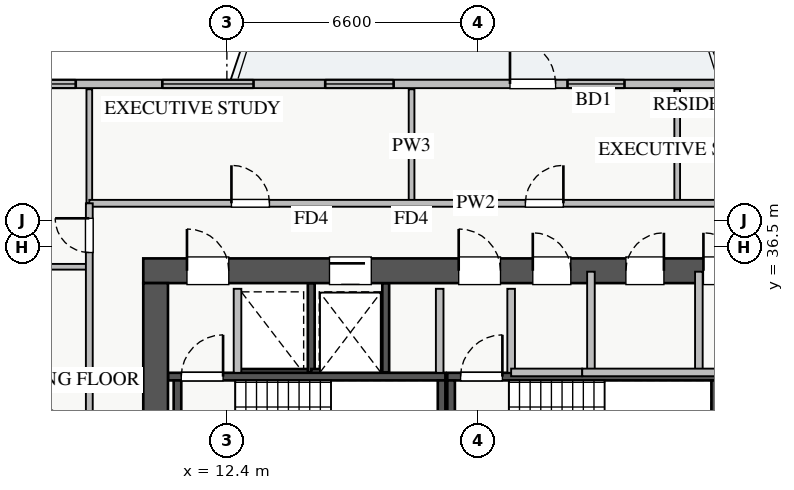
"""IFC4 building model, lengths in metres.
Left out: names, types, materials, properties, quantities, classifications, styles, units other than length and angle.
Written with IfcOpenShell. Run it as: python <this file> out.ifc"""

import sys

from ifc_helpers import new_model, si_unit, direction, frame, frame_2d, origin, place, context, subcontext, project, spatial, rectangle, extrude, source, transform, mapped, element, fill, save


model = new_model("IFC4")
c1 = context("Model", 3, precision=1e-05, world=origin(), true_north=direction((0.0, 1.0)))
c2 = subcontext(c1, "Body", "Model", "MODEL_VIEW")
j1 = project(units=[si_unit("LENGTHUNIT", "METRE"), si_unit("PLANEANGLEUNIT", "RADIAN")], contexts=[c1])
p1 = place(None, origin())
s1 = spatial("IfcSite", under=j1, at=p1, CompositionType="ELEMENT")
p2 = place(p1, origin())
s2 = spatial("IfcBuilding", under=s1, at=p2, CompositionType="ELEMENT")
p3 = place(p2, frame((0.0, 0.0, 110.0)))
s3 = spatial("IfcBuildingStorey", under=s2, at=p3, CompositionType="ELEMENT", Elevation=110.0)
p4 = place(p3, frame((12.68, 33.2, 0.0), z_axis=(0.0, 0.0, 1.0), x_axis=(1.0, 0.0, 0.0)))
e1 = element("IfcWall", 1, at=p4, inside=s3, PredefinedType="SHEAR", context=c2, shape_type="SweptSolid", body=[
    extrude(rectangle(XDim=1.94, YDim=0.18, at=frame_2d((0.97, 0.0))), origin(), (0.0, 0.0, 1.0), 3.07),
])
p5 = place(p3, frame((14.62, 33.2, 0.0), z_axis=(0.0, 0.0, 1.0), x_axis=(0.0, 1.0, 0.0)))
e2 = element("IfcWall", 2, at=p5, inside=s3, PredefinedType="SHEAR", context=c2, shape_type="SweptSolid", body=[
    extrude(rectangle(XDim=2.35, YDim=0.18, at=frame_2d((1.175, 0.0))), origin(), (0.0, 0.0, 1.0), 3.07),
])
p6 = place(p3, frame((14.62, 33.2, 0.0), z_axis=(0.0, 0.0, 1.0), x_axis=(1.0, 0.0, 0.0)))
e3 = element("IfcWall", 3, at=p6, inside=s3, PredefinedType="SHEAR", context=c2, shape_type="SweptSolid", body=[
    extrude(rectangle(XDim=1.96, YDim=0.18, at=frame_2d((0.98, 0.0))), origin(), (0.0, 0.0, 1.0), 3.07),
])
p7 = place(p3, frame((16.58, 33.2, 0.0), z_axis=(0.0, 0.0, 1.0), x_axis=(0.0, 1.0, 0.0)))
e4 = element("IfcWall", 4, at=p7, inside=s3, PredefinedType="SHEAR", context=c2, shape_type="SweptSolid", body=[
    extrude(rectangle(XDim=2.35, YDim=0.18, at=frame_2d((1.175, 0.0))), origin(), (0.0, 0.0, 1.0), 3.07),
])
p8 = place(p3, frame((10.85, 33.09, 0.0), z_axis=(0.0, 0.0, 1.0), x_axis=(1.0, 0.0, 0.0)))
e5 = element("IfcWall", 5, at=p8, inside=s3, PredefinedType="SHEAR", context=c2, shape_type="SweptSolid", body=[
    extrude(rectangle(XDim=7.3, YDim=0.2, at=frame_2d((3.65, 0.0))), origin(), (0.0, 0.0, 1.0), 3.25),
])
p9 = place(p8, frame((0.35, 0.0, 0.0)))
e6 = element("IfcOpeningElement", 6, at=p9, cuts=e5, PredefinedType="OPENING", context=c2, shape_type="SweptSolid", body=[
    extrude(rectangle(XDim=1.1, YDim=2.05, at=frame_2d((0.55, 1.025))), frame((0.0, 0.11, 0.0), z_axis=(0.0, -1.0, 0.0), x_axis=(1.0, 0.0, 0.0)), (0.0, 0.0, 1.0), 0.22),
])
for number, where, z_axis, x_axis in (
    (7, (11.1, 30.05, 0.0), (0.0, 0.0, 1.0), (0.0, 1.0, 0.0)),
    (8, (18.05, 30.05, 0.0), (0.0, 0.0, 1.0), (0.0, 1.0, 0.0)),
):
    element("IfcWall", number, at=place(p3, frame(where, z_axis=z_axis, x_axis=x_axis)), inside=s3, PredefinedType="SHEAR", context=c2, shape_type="SweptSolid", body=[
        extrude(rectangle(XDim=2.94, YDim=0.2, at=frame_2d((1.47, 0.0))), origin(), (0.0, 0.0, 1.0), 3.25),
    ])
p10 = place(p3, frame((18.2, 33.09, 0.0), z_axis=(0.0, 0.0, 1.0), x_axis=(1.0, 0.0, 0.0)))
e9 = element("IfcWall", 9, at=p10, inside=s3, PredefinedType="SHEAR", context=c2, shape_type="SweptSolid", body=[
    extrude(rectangle(XDim=7.15, YDim=0.2, at=frame_2d((3.575, 0.0))), origin(), (0.0, 0.0, 1.0), 3.25),
])
p11 = place(p10, frame((0.35, 0.0, 0.0)))
e10 = element("IfcOpeningElement", 10, at=p11, cuts=e9, PredefinedType="OPENING", context=c2, shape_type="SweptSolid", body=[
    extrude(rectangle(XDim=1.1, YDim=2.05, at=frame_2d((0.55, 1.025))), frame((0.0, 0.11, 0.0), z_axis=(0.0, -1.0, 0.0), x_axis=(1.0, 0.0, 0.0)), (0.0, 0.0, 1.0), 0.22),
])
for number, where, z_axis, x_axis in (
    (11, (18.3, 30.05, 0.0), (0.0, 0.0, 1.0), (0.0, 1.0, 0.0)),
    (12, (25.25, 30.05, 0.0), (0.0, 0.0, 1.0), (0.0, 1.0, 0.0)),
):
    element("IfcWall", number, at=place(p3, frame(where, z_axis=z_axis, x_axis=x_axis)), inside=s3, PredefinedType="SHEAR", context=c2, shape_type="SweptSolid", body=[
        extrude(rectangle(XDim=2.94, YDim=0.2, at=frame_2d((1.47, 0.0))), origin(), (0.0, 0.0, 1.0), 3.25),
    ])
p12 = place(p3, frame((10.2, 35.875, 0.0), z_axis=(0.0, 0.0, 1.0), x_axis=(1.0, 0.0, 0.0)))
e13 = element("IfcWall", 13, at=p12, inside=s3, PredefinedType="SHEAR", context=c2, shape_type="SweptSolid", body=[
    extrude(rectangle(XDim=17.6, YDim=0.65, at=frame_2d((8.8, 0.0))), origin(), (0.0, 0.0, 1.0), 3.25),
])
p13 = place(p12, frame((1.15, 0.0, 0.0)))
e14 = element("IfcOpeningElement", 14, at=p13, cuts=e13, PredefinedType="OPENING", context=c2, shape_type="SweptSolid", body=[
    extrude(rectangle(XDim=1.1, YDim=2.05, at=frame_2d((0.55, 1.025))), frame((0.0, 0.335, 0.0), z_axis=(0.0, -1.0, 0.0), x_axis=(1.0, 0.0, 0.0)), (0.0, 0.0, 1.0), 0.67),
])
p14 = place(p12, frame((8.3, 0.0, 0.0)))
e15 = element("IfcOpeningElement", 15, at=p14, cuts=e13, PredefinedType="OPENING", context=c2, shape_type="SweptSolid", body=[
    extrude(rectangle(XDim=1.1, YDim=2.05, at=frame_2d((0.55, 1.025))), frame((0.0, 0.335, 0.0), z_axis=(0.0, -1.0, 0.0), x_axis=(1.0, 0.0, 0.0)), (0.0, 0.0, 1.0), 0.67),
])
p15 = place(p12, frame((4.9, 0.0, 0.0)))
e16 = element("IfcOpeningElement", 16, at=p15, cuts=e13, PredefinedType="OPENING", context=c2, shape_type="SweptSolid", body=[
    extrude(rectangle(XDim=1.1, YDim=2.05, at=frame_2d((0.55, 1.025))), frame((0.0, 0.335, 0.0), z_axis=(0.0, -1.0, 0.0), x_axis=(1.0, 0.0, 0.0)), (0.0, 0.0, 1.0), 0.67),
])
p16 = place(p12, frame((14.74, 0.0, 0.0)))
e17 = element("IfcOpeningElement", 17, at=p16, cuts=e13, PredefinedType="OPENING", context=c2, shape_type="SweptSolid", body=[
    extrude(rectangle(XDim=1.0, YDim=2.05, at=frame_2d((0.5, 1.025))), frame((0.0, 0.335, 0.0), z_axis=(0.0, -1.0, 0.0), x_axis=(1.0, 0.0, 0.0)), (0.0, 0.0, 1.0), 0.67),
])
p17 = place(p12, frame((10.25, 0.0, 0.0)))
e18 = element("IfcOpeningElement", 18, at=p17, cuts=e13, PredefinedType="OPENING", context=c2, shape_type="SweptSolid", body=[
    extrude(rectangle(XDim=1.0, YDim=2.05, at=frame_2d((0.5, 1.025))), frame((0.0, 0.335, 0.0), z_axis=(0.0, -1.0, 0.0), x_axis=(1.0, 0.0, 0.0)), (0.0, 0.0, 1.0), 0.67),
])
p18 = place(p12, frame((12.7, 0.0, 0.0)))
e19 = element("IfcOpeningElement", 19, at=p18, cuts=e13, PredefinedType="OPENING", context=c2, shape_type="SweptSolid", body=[
    extrude(rectangle(XDim=1.0, YDim=2.05, at=frame_2d((0.5, 1.025))), frame((0.0, 0.335, 0.0), z_axis=(0.0, -1.0, 0.0), x_axis=(1.0, 0.0, 0.0)), (0.0, 0.0, 1.0), 0.67),
])
p19 = place(p3, frame((10.525, 29.65, 0.0), z_axis=(0.0, 0.0, 1.0), x_axis=(0.0, 1.0, 0.0)))
e20 = element("IfcWall", 20, at=p19, inside=s3, PredefinedType="SHEAR", context=c2, shape_type="SweptSolid", body=[
    extrude(rectangle(XDim=5.9, YDim=0.65, at=frame_2d((2.95, 0.0))), origin(), (0.0, 0.0, 1.0), 3.25),
])
p20 = place(p3, frame((6.55, 40.79, 0.0), z_axis=(0.0, 0.0, 1.0), x_axis=(1.0, 0.0, 0.0)))
e21 = element("IfcWall", 21, at=p20, inside=s3, PredefinedType="STANDARD", context=c2, shape_type="SweptSolid", body=[
    extrude(rectangle(XDim=24.9, YDim=0.22, at=frame_2d((12.45, 0.0))), origin(), (0.0, 0.0, 1.0), 2.61),
])
p21 = place(p20, frame((13.3, 0.0, 0.0)))
e22 = element("IfcOpeningElement", 22, at=p21, cuts=e21, PredefinedType="OPENING", context=c2, shape_type="SweptSolid", body=[
    extrude(rectangle(XDim=1.2, YDim=2.1, at=frame_2d((0.6, 1.05))), frame((0.0, 0.12, 0.0), z_axis=(0.0, -1.0, 0.0), x_axis=(1.0, 0.0, 0.0)), (0.0, 0.0, 1.0), 0.24),
])
p22 = place(p20, frame((0.373, 0.0, 0.9)))
e23 = element("IfcOpeningElement", 23, at=p22, cuts=e21, PredefinedType="OPENING", context=c2, shape_type="SweptSolid", body=[
    extrude(rectangle(XDim=1.5, YDim=1.5, at=frame_2d((0.75, 0.75))), frame((0.0, 0.12, 0.0), z_axis=(0.0, -1.0, 0.0), x_axis=(1.0, 0.0, 0.0)), (0.0, 0.0, 1.0), 0.24),
])
p23 = place(p20, frame((8.438, 0.0, 0.9)))
e24 = element("IfcOpeningElement", 24, at=p23, cuts=e21, PredefinedType="OPENING", context=c2, shape_type="SweptSolid", body=[
    extrude(rectangle(XDim=1.8, YDim=1.45, at=frame_2d((0.9, 0.725))), frame((0.0, 0.12, 0.0), z_axis=(0.0, -1.0, 0.0), x_axis=(1.0, 0.0, 0.0)), (0.0, 0.0, 1.0), 0.24),
])
p24 = place(p20, frame((14.813, 0.0, 0.9)))
e25 = element("IfcOpeningElement", 25, at=p24, cuts=e21, PredefinedType="OPENING", context=c2, shape_type="SweptSolid", body=[
    extrude(rectangle(XDim=1.5, YDim=1.45, at=frame_2d((0.75, 0.725))), frame((0.0, 0.12, 0.0), z_axis=(0.0, -1.0, 0.0), x_axis=(1.0, 0.0, 0.0)), (0.0, 0.0, 1.0), 0.24),
])
p25 = place(p20, frame((20.738, 0.0, 0.9)))
e26 = element("IfcOpeningElement", 26, at=p25, cuts=e21, PredefinedType="OPENING", context=c2, shape_type="SweptSolid", body=[
    extrude(rectangle(XDim=2.1, YDim=1.48, at=frame_2d((1.05, 0.74))), frame((0.0, 0.12, 0.0), z_axis=(0.0, -1.0, 0.0), x_axis=(1.0, 0.0, 0.0)), (0.0, 0.0, 1.0), 0.24),
])
p26 = place(p20, frame((4.152, 0.0, 0.9)))
e27 = element("IfcOpeningElement", 27, at=p26, cuts=e21, PredefinedType="OPENING", context=c2, shape_type="SweptSolid", body=[
    extrude(rectangle(XDim=2.4, YDim=1.5, at=frame_2d((1.2, 0.75))), frame((0.0, 0.12, 0.0), z_axis=(0.0, -1.0, 0.0), x_axis=(1.0, 0.0, 0.0)), (0.0, 0.0, 1.0), 0.24),
])
for number, where, z_axis, x_axis in (
    (28, (12.68, 33.19, 0.0), (0.0, 0.0, 1.0), (0.0, 1.0, 0.0)),
    (29, (18.0, 33.19, 0.0), (0.0, 0.0, 1.0), (0.0, 1.0, 0.0)),
    (30, (19.88, 33.19, 0.0), (0.0, 0.0, 1.0), (0.0, 1.0, 0.0)),
):
    element("IfcWall", number, at=place(p3, frame(where, z_axis=z_axis, x_axis=x_axis)), inside=s3, PredefinedType="PARTITIONING", context=c2, shape_type="SweptSolid", body=[
        extrude(rectangle(XDim=2.21, YDim=0.2, at=frame_2d((1.105, 0.0))), origin(), (0.0, 0.0, 1.0), 3.07),
    ])
p27 = place(p3, frame((24.82, 33.2, 0.0), z_axis=(0.0, 0.0, 1.0), x_axis=(0.0, 1.0, 0.0)))
e31 = element("IfcWall", 31, at=p27, inside=s3, PredefinedType="PARTITIONING", context=c2, shape_type="SweptSolid", body=[
    extrude(rectangle(XDim=2.65, YDim=0.2, at=frame_2d((1.325, 0.0))), origin(), (0.0, 0.0, 1.0), 3.07),
])
p28 = place(p3, frame((19.88, 33.2, 0.0), z_axis=(0.0, 0.0, 1.0), x_axis=(1.0, 0.0, 0.0)))
e32 = element("IfcWall", 32, at=p28, inside=s3, PredefinedType="PARTITIONING", context=c2, shape_type="SweptSolid", body=[
    extrude(rectangle(XDim=1.87, YDim=0.2, at=frame_2d((0.935, 0.0))), origin(), (0.0, 0.0, 1.0), 3.07),
])
p29 = place(p3, frame((21.98, 33.2, 0.0), z_axis=(0.0, 0.0, 1.0), x_axis=(0.0, 1.0, 0.0)))
e33 = element("IfcWall", 33, at=p29, inside=s3, PredefinedType="PARTITIONING", context=c2, shape_type="SweptSolid", body=[
    extrude(rectangle(XDim=2.65, YDim=0.2, at=frame_2d((1.325, 0.0))), origin(), (0.0, 0.0, 1.0), 3.07),
])
p30 = place(p3, frame((21.75, 33.2, 0.0), z_axis=(0.0, 0.0, 1.0), x_axis=(1.0, 0.0, 0.0)))
e34 = element("IfcWall", 34, at=p30, inside=s3, PredefinedType="PARTITIONING", context=c2, shape_type="SweptSolid", body=[
    extrude(rectangle(XDim=5.17, YDim=0.2, at=frame_2d((2.585, 0.0))), origin(), (0.0, 0.0, 1.0), 3.07),
])
for number, where, z_axis, x_axis in (
    (35, (17.26, 37.65, 0.0), (0.0, 0.0, 1.0), (0.0, 1.0, 0.0)),
    (36, (24.25, 37.65, 0.0), (0.0, 0.0, 1.0), (0.0, 1.0, 0.0)),
    (37, (8.78, 37.65, 0.0), (0.0, 0.0, 1.0), (0.0, 1.0, 0.0)),
):
    element("IfcWall", number, at=place(p3, frame(where, z_axis=z_axis, x_axis=x_axis)), inside=s3, PredefinedType="PARTITIONING", context=c2, shape_type="SweptSolid", body=[
        extrude(rectangle(XDim=3.0, YDim=0.15, at=frame_2d((1.5, 0.0))), origin(), (0.0, 0.0, 1.0), 3.07),
    ])
p31 = place(p3, frame((8.78, 37.65, 0.0), z_axis=(0.0, 0.0, 1.0), x_axis=(1.0, 0.0, 0.0)))
e38 = element("IfcWall", 38, at=p31, inside=s3, PredefinedType="PARTITIONING", context=c2, shape_type="SweptSolid", body=[
    extrude(rectangle(XDim=23.54, YDim=0.18, at=frame_2d((11.77, 0.0))), origin(), (0.0, 0.0, 1.0), 3.07),
])
p32 = place(p31, frame((3.74, 0.0, 0.0)))
e39 = element("IfcOpeningElement", 39, at=p32, cuts=e38, PredefinedType="OPENING", context=c2, shape_type="SweptSolid", body=[
    extrude(rectangle(XDim=1.0, YDim=2.05, at=frame_2d((0.5, 1.025))), frame((0.0, 0.1, 0.0), z_axis=(0.0, -1.0, 0.0), x_axis=(1.0, 0.0, 0.0)), (0.0, 0.0, 1.0), 0.2),
])
p33 = place(p31, frame((11.475, 0.0, 0.0)))
e40 = element("IfcOpeningElement", 40, at=p33, cuts=e38, PredefinedType="OPENING", context=c2, shape_type="SweptSolid", body=[
    extrude(rectangle(XDim=1.0, YDim=2.05, at=frame_2d((0.5, 1.025))), frame((0.0, 0.1, 0.0), z_axis=(0.0, -1.0, 0.0), x_axis=(1.0, 0.0, 0.0)), (0.0, 0.0, 1.0), 0.2),
])
p34 = place(p31, frame((18.835, 0.0, 0.0)))
e41 = element("IfcOpeningElement", 41, at=p34, cuts=e38, PredefinedType="OPENING", context=c2, shape_type="SweptSolid", body=[
    extrude(rectangle(XDim=1.0, YDim=2.05, at=frame_2d((0.5, 1.025))), frame((0.0, 0.1, 0.0), z_axis=(0.0, -1.0, 0.0), x_axis=(1.0, 0.0, 0.0)), (0.0, 0.0, 1.0), 0.2),
])
p35 = place(p3, frame((1.35, 35.98, 0.0), z_axis=(0.0, 0.0, 1.0), x_axis=(1.0, 0.0, 0.0)))
e42 = element("IfcWall", 42, at=p35, inside=s3, PredefinedType="PARTITIONING", context=c2, shape_type="SweptSolid", body=[
    extrude(rectangle(XDim=7.43, YDim=0.15, at=frame_2d((3.715, 0.0))), origin(), (0.0, 0.0, 1.0), 3.07),
])
p36 = place(p3, frame((8.78, 8.31, 0.0), z_axis=(0.0, 0.0, 1.0), x_axis=(0.0, 1.0, 0.0)))
e43 = element("IfcWall", 43, at=p36, inside=s3, PredefinedType="PARTITIONING", context=c2, shape_type="SweptSolid", body=[
    extrude(rectangle(XDim=29.34, YDim=0.18, at=frame_2d((14.67, 0.0))), origin(), (0.0, 0.0, 1.0), 3.07),
])
p37 = place(p36, frame((28.045, 0.0, 0.0)))
e44 = element("IfcOpeningElement", 44, at=p37, cuts=e43, PredefinedType="OPENING", context=c2, shape_type="SweptSolid", body=[
    extrude(rectangle(XDim=0.9, YDim=2.05, at=frame_2d((0.45, 1.025))), frame((0.0, 0.1, 0.0), z_axis=(0.0, -1.0, 0.0), x_axis=(1.0, 0.0, 0.0)), (0.0, 0.0, 1.0), 0.2),
])
p38 = place(p36, frame((0.24, 0.0, 0.0)))
e45 = element("IfcOpeningElement", 45, at=p38, cuts=e43, PredefinedType="OPENING", context=c2, shape_type="SweptSolid", body=[
    extrude(rectangle(XDim=0.9, YDim=2.05, at=frame_2d((0.45, 1.025))), frame((0.0, 0.1, 0.0), z_axis=(0.0, -1.0, 0.0), x_axis=(1.0, 0.0, 0.0)), (0.0, 0.0, 1.0), 0.2),
])
p39 = place(p36, frame((5.455, 0.0, 0.0)))
e46 = element("IfcOpeningElement", 46, at=p39, cuts=e43, PredefinedType="OPENING", context=c2, shape_type="SweptSolid", body=[
    extrude(rectangle(XDim=1.0, YDim=2.05, at=frame_2d((0.5, 1.025))), frame((0.0, 0.1, 0.0), z_axis=(0.0, -1.0, 0.0), x_axis=(1.0, 0.0, 0.0)), (0.0, 0.0, 1.0), 0.2),
])
p40 = place(p36, frame((11.865, 0.0, 0.0)))
e47 = element("IfcOpeningElement", 47, at=p40, cuts=e43, PredefinedType="OPENING", context=c2, shape_type="SweptSolid", body=[
    extrude(rectangle(XDim=1.0, YDim=2.05, at=frame_2d((0.5, 1.025))), frame((0.0, 0.1, 0.0), z_axis=(0.0, -1.0, 0.0), x_axis=(1.0, 0.0, 0.0)), (0.0, 0.0, 1.0), 0.2),
])
p41 = place(p36, frame((20.315, 0.0, 0.0)))
e48 = element("IfcOpeningElement", 48, at=p41, cuts=e43, PredefinedType="OPENING", context=c2, shape_type="SweptSolid", body=[
    extrude(rectangle(XDim=1.0, YDim=2.05, at=frame_2d((0.5, 1.025))), frame((0.0, 0.1, 0.0), z_axis=(0.0, -1.0, 0.0), x_axis=(1.0, 0.0, 0.0)), (0.0, 0.0, 1.0), 0.2),
])
m1 = source(origin(), c2, "Body", "SweptSolid", [
    extrude(rectangle(XDim=1.2, YDim=2.1, at=frame_2d((0.6, 1.05))), frame((0.0, 0.025, 0.0), z_axis=(0.0, -1.0, 0.0), x_axis=(1.0, 0.0, 0.0)), (0.0, 0.0, 1.0), 0.05),
])
p42 = place(p21, origin())
e49 = element("IfcDoor", 49, at=p42, inside=s3, OperationType="SINGLE_SWING_LEFT", PredefinedType="DOOR", context=c2, shape_type="MappedRepresentation", body=[
    mapped(m1, transform((0.0, 0.0, 0.0), x_axis=(1.0, 0.0, 0.0), y_axis=(0.0, 1.0, 0.0), z_axis=(0.0, 0.0, 1.0), scale=1.0)),
])
fill(e22, e49)
m2 = source(origin(), c2, "Body", "SweptSolid", [
    extrude(rectangle(XDim=1.5, YDim=1.5, at=frame_2d((0.75, 0.75))), frame((0.0, 0.03, 0.0), z_axis=(0.0, -1.0, 0.0), x_axis=(1.0, 0.0, 0.0)), (0.0, 0.0, 1.0), 0.06),
])
p43 = place(p22, origin())
e50 = element("IfcWindow", 50, at=p43, inside=s3, PartitioningType="TRIPLE_PANEL_VERTICAL", PredefinedType="WINDOW", context=c2, shape_type="MappedRepresentation", body=[
    mapped(m2, transform((0.0, 0.0, 0.0), x_axis=(1.0, 0.0, 0.0), y_axis=(0.0, 1.0, 0.0), z_axis=(0.0, 0.0, 1.0), scale=1.0)),
])
fill(e23, e50)
m3 = source(origin(), c2, "Body", "SweptSolid", [
    extrude(rectangle(XDim=1.8, YDim=1.45, at=frame_2d((0.9, 0.725))), frame((0.0, 0.03, 0.0), z_axis=(0.0, -1.0, 0.0), x_axis=(1.0, 0.0, 0.0)), (0.0, 0.0, 1.0), 0.06),
])
p44 = place(p23, origin())
e51 = element("IfcWindow", 51, at=p44, inside=s3, PartitioningType="DOUBLE_PANEL_VERTICAL", PredefinedType="WINDOW", context=c2, shape_type="MappedRepresentation", body=[
    mapped(m3, transform((0.0, 0.0, 0.0), x_axis=(1.0, 0.0, 0.0), y_axis=(0.0, 1.0, 0.0), z_axis=(0.0, 0.0, 1.0), scale=1.0)),
])
fill(e24, e51)
m4 = source(origin(), c2, "Body", "SweptSolid", [
    extrude(rectangle(XDim=1.5, YDim=1.45, at=frame_2d((0.75, 0.725))), frame((0.0, 0.03, 0.0), z_axis=(0.0, -1.0, 0.0), x_axis=(1.0, 0.0, 0.0)), (0.0, 0.0, 1.0), 0.06),
])
p45 = place(p24, origin())
e52 = element("IfcWindow", 52, at=p45, inside=s3, PartitioningType="DOUBLE_PANEL_VERTICAL", PredefinedType="WINDOW", context=c2, shape_type="MappedRepresentation", body=[
    mapped(m4, transform((0.0, 0.0, 0.0), x_axis=(1.0, 0.0, 0.0), y_axis=(0.0, 1.0, 0.0), z_axis=(0.0, 0.0, 1.0), scale=1.0)),
])
fill(e25, e52)
m5 = source(origin(), c2, "Body", "SweptSolid", [
    extrude(rectangle(XDim=1.1, YDim=2.05, at=frame_2d((0.55, 1.025))), frame((0.0, 0.025, 0.0), z_axis=(0.0, -1.0, 0.0), x_axis=(1.0, 0.0, 0.0)), (0.0, 0.0, 1.0), 0.05),
])
p46 = place(p13, origin())
e53 = element("IfcDoor", 53, at=p46, inside=s3, OperationType="SINGLE_SWING_LEFT", PredefinedType="DOOR", context=c2, shape_type="MappedRepresentation", body=[
    mapped(m5, transform((0.0, 0.0, 0.0), x_axis=(1.0, 0.0, 0.0), y_axis=(0.0, 1.0, 0.0), z_axis=(0.0, 0.0, 1.0), scale=1.0)),
])
fill(e14, e53)
p47 = place(p9, origin())
e54 = element("IfcDoor", 54, at=p47, inside=s3, OperationType="SINGLE_SWING_RIGHT", PredefinedType="DOOR", context=c2, shape_type="MappedRepresentation", body=[
    mapped(m5, transform((0.0, 0.0, 0.0), x_axis=(1.0, 0.0, 0.0), y_axis=(0.0, 1.0, 0.0), z_axis=(0.0, 0.0, 1.0), scale=1.0)),
])
fill(e6, e54)
p48 = place(p14, origin())
e55 = element("IfcDoor", 55, at=p48, inside=s3, OperationType="SINGLE_SWING_LEFT", PredefinedType="DOOR", context=c2, shape_type="MappedRepresentation", body=[
    mapped(m5, transform((0.0, 0.0, 0.0), x_axis=(1.0, 0.0, 0.0), y_axis=(0.0, 1.0, 0.0), z_axis=(0.0, 0.0, 1.0), scale=1.0)),
])
fill(e15, e55)
p49 = place(p11, origin())
e56 = element("IfcDoor", 56, at=p49, inside=s3, OperationType="SINGLE_SWING_RIGHT", PredefinedType="DOOR", context=c2, shape_type="MappedRepresentation", body=[
    mapped(m5, transform((0.0, 0.0, 0.0), x_axis=(1.0, 0.0, 0.0), y_axis=(0.0, 1.0, 0.0), z_axis=(0.0, 0.0, 1.0), scale=1.0)),
])
fill(e10, e56)
p50 = place(p15, origin())
e57 = element("IfcDoor", 57, at=p50, inside=s3, OperationType="SLIDING_TO_LEFT", PredefinedType="DOOR", context=c2, shape_type="MappedRepresentation", body=[
    mapped(m5, transform((0.0, 0.0, 0.0), x_axis=(1.0, 0.0, 0.0), y_axis=(0.0, 1.0, 0.0), z_axis=(0.0, 0.0, 1.0), scale=1.0)),
])
fill(e16, e57)
m6 = source(origin(), c2, "Body", "SweptSolid", [
    extrude(rectangle(XDim=1.0, YDim=2.05, at=frame_2d((0.5, 1.025))), frame((0.0, 0.025, 0.0), z_axis=(0.0, -1.0, 0.0), x_axis=(1.0, 0.0, 0.0)), (0.0, 0.0, 1.0), 0.05),
])
p51 = place(p16, origin())
e58 = element("IfcDoor", 58, at=p51, inside=s3, OperationType="SINGLE_SWING_LEFT", PredefinedType="DOOR", context=c2, shape_type="MappedRepresentation", body=[
    mapped(m6, transform((0.0, 0.0, 0.0), x_axis=(1.0, 0.0, 0.0), y_axis=(0.0, 1.0, 0.0), z_axis=(0.0, 0.0, 1.0), scale=1.0)),
])
fill(e17, e58)
p52 = place(p17, origin())
e59 = element("IfcDoor", 59, at=p52, inside=s3, OperationType="SINGLE_SWING_LEFT", PredefinedType="DOOR", context=c2, shape_type="MappedRepresentation", body=[
    mapped(m6, transform((0.0, 0.0, 0.0), x_axis=(1.0, 0.0, 0.0), y_axis=(0.0, 1.0, 0.0), z_axis=(0.0, 0.0, 1.0), scale=1.0)),
])
fill(e18, e59)
p53 = place(p18, origin())
e60 = element("IfcDoor", 60, at=p53, inside=s3, OperationType="SINGLE_SWING_RIGHT", PredefinedType="DOOR", context=c2, shape_type="MappedRepresentation", body=[
    mapped(m6, transform((0.0, 0.0, 0.0), x_axis=(1.0, 0.0, 0.0), y_axis=(0.0, 1.0, 0.0), z_axis=(0.0, 0.0, 1.0), scale=1.0)),
])
fill(e19, e60)
p54 = place(p32, origin())
e61 = element("IfcDoor", 61, at=p54, inside=s3, OperationType="SINGLE_SWING_LEFT", PredefinedType="DOOR", context=c2, shape_type="MappedRepresentation", body=[
    mapped(m6, transform((0.0, 0.0, 0.0), x_axis=(1.0, 0.0, 0.0), y_axis=(0.0, 1.0, 0.0), z_axis=(0.0, 0.0, 1.0), scale=1.0)),
])
fill(e39, e61)
p55 = place(p33, origin())
e62 = element("IfcDoor", 62, at=p55, inside=s3, OperationType="SINGLE_SWING_RIGHT", PredefinedType="DOOR", context=c2, shape_type="MappedRepresentation", body=[
    mapped(m6, transform((0.0, 0.0, 0.0), x_axis=(1.0, 0.0, 0.0), y_axis=(0.0, 1.0, 0.0), z_axis=(0.0, 0.0, 1.0), scale=1.0)),
])
fill(e40, e62)
m7 = source(origin(), c2, "Body", "SweptSolid", [
    extrude(rectangle(XDim=0.9, YDim=2.05, at=frame_2d((0.45, 1.025))), frame((0.0, 0.025, 0.0), z_axis=(0.0, -1.0, 0.0), x_axis=(1.0, 0.0, 0.0)), (0.0, 0.0, 1.0), 0.05),
])
p56 = place(p37, origin())
e63 = element("IfcDoor", 63, at=p56, inside=s3, OperationType="SINGLE_SWING_RIGHT", PredefinedType="DOOR", context=c2, shape_type="MappedRepresentation", body=[
    mapped(m7, transform((0.0, 0.0, 0.0), x_axis=(1.0, 0.0, 0.0), y_axis=(0.0, 1.0, 0.0), z_axis=(0.0, 0.0, 1.0), scale=1.0)),
])
fill(e44, e63)
m8 = source(origin(), c2, "Body", "SweptSolid", [
    extrude(rectangle(XDim=2.4, YDim=1.5, at=frame_2d((1.2, 0.75))), frame((0.0, 0.03, 0.0), z_axis=(0.0, -1.0, 0.0), x_axis=(1.0, 0.0, 0.0)), (0.0, 0.0, 1.0), 0.06),
])
p57 = place(p26, origin())
e64 = element("IfcWindow", 64, at=p57, inside=s3, PartitioningType="TRIPLE_PANEL_VERTICAL", PredefinedType="WINDOW", context=c2, shape_type="MappedRepresentation", body=[
    mapped(m8, transform((0.0, 0.0, 0.0), x_axis=(1.0, 0.0, 0.0), y_axis=(0.0, 1.0, 0.0), z_axis=(0.0, 0.0, 1.0), scale=1.0)),
])
fill(e27, e64)
save(model, sys.argv[1])
